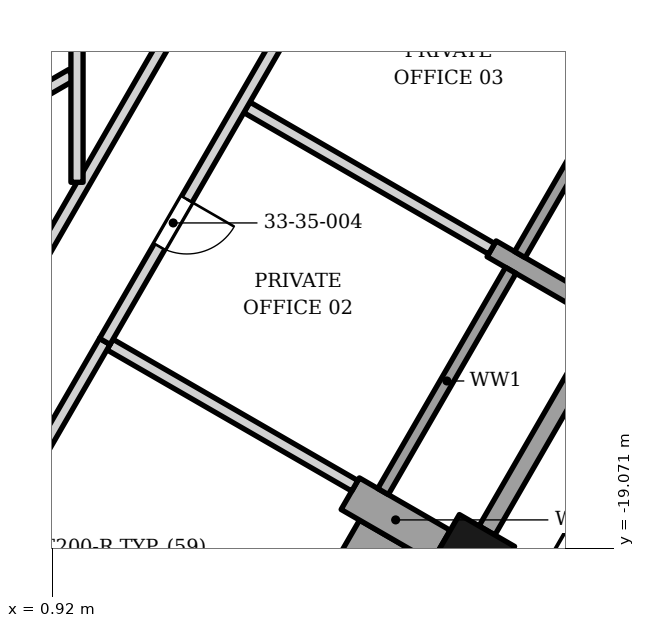
"""IFC4 building model, lengths in metres.
Left out: names, types, materials, properties, quantities, classifications, styles, units other than length and angle.
Written with IfcOpenShell. Run it as: python <this file> out.ifc"""

import sys

from ifc_helpers import new_model, si_unit, direction, frame, frame_2d, origin, origin_2d, place, context, subcontext, project, spatial, polyline, rectangle, outline, extrude, element, fill, save


model = new_model("IFC4")
c1 = context("Model", 3, precision=1e-05, world=origin(), true_north=direction((0.0, 1.0)))
c2 = subcontext(c1, "Body", "Model", "MODEL_VIEW")
j1 = project(units=[si_unit("LENGTHUNIT", "METRE"), si_unit("PLANEANGLEUNIT", "RADIAN")], contexts=[c1])
p1 = place(None, origin())
s1 = spatial("IfcSite", under=j1, at=p1, CompositionType="ELEMENT")
p2 = place(p1, origin())
s2 = spatial("IfcBuilding", under=s1, at=p2, CompositionType="ELEMENT")
p3 = place(p2, frame((0.0, 0.0, 144.6)))
s3 = spatial("IfcBuildingStorey", under=s2, at=p3, CompositionType="ELEMENT", Elevation=144.6)
p4 = place(p3, frame((7.846, -19.167, 0.0), z_axis=(0.0, 0.0, 1.0), x_axis=(0.499999984885, 0.866025412511, 0.0)))
e1 = element("IfcColumn", 1, at=p4, inside=s3, PredefinedType="COLUMN", context=c2, shape_type="SweptSolid", body=[
    extrude(rectangle(XDim=0.9, YDim=1.05, at=origin_2d()), origin(), (0.0, 0.0, 1.0), 3.9),
])
p5 = place(p3, frame((7.316, -19.034, 0.0), z_axis=(0.0, 0.0, 1.0), x_axis=(-0.866013532718, 0.500020560727, 0.0)))
e2 = element("IfcWall", 2, at=p5, inside=s3, PredefinedType="SOLIDWALL", context=c2, shape_type="SweptSolid", body=[
    extrude(rectangle(XDim=1.725, YDim=0.6, at=frame_2d((0.863, 0.0))), origin(), (0.0, 0.0, 1.0), 3.0),
])
p6 = place(p3, frame((9.641, -15.007, 0.0), z_axis=(0.0, 0.0, 1.0), x_axis=(-0.866013532718, 0.500020560727, 0.0)))
e3 = element("IfcWall", 3, at=p6, inside=s3, PredefinedType="SOLIDWALL", context=c2, shape_type="SweptSolid", body=[
    extrude(rectangle(XDim=1.725, YDim=0.3, at=frame_2d((0.863, 0.0))), origin(), (0.0, 0.0, 1.0), 3.0),
])
p7 = place(p3, frame((8.071, -18.777, 0.0), z_axis=(0.0, 0.0, 1.0), x_axis=(0.500012057535, 0.866018442252, 0.0)))
e4 = element("IfcWall", 4, at=p7, inside=s3, PredefinedType="SOLIDWALL", context=c2, shape_type="SweptSolid", body=[
    extrude(rectangle(XDim=3.6, YDim=0.3, at=frame_2d((1.8, 0.0))), origin(), (0.0, 0.0, 1.0), 3.0),
])
p8 = place(p3, frame((6.362, -18.137, 0.0), z_axis=(0.0, 0.0, 1.0), x_axis=(0.500002543286, 0.866023935413, 0.0)))
e5 = element("IfcWall", 5, at=p8, inside=s3, PredefinedType="ELEMENTEDWALL", context=c2, shape_type="SweptSolid", body=[
    extrude(rectangle(XDim=4.2, YDim=0.2, at=frame_2d((2.1, 0.0))), origin(), (0.0, 0.0, 1.0), 3.0),
])
p9 = place(p3, frame((8.612, -14.24, 0.0), z_axis=(0.0, 0.0, 1.0), x_axis=(0.500027713859, 0.866009402589, 0.0)))
e6 = element("IfcWall", 6, at=p9, inside=s3, PredefinedType="ELEMENTEDWALL", context=c2, shape_type="SweptSolid", body=[
    extrude(rectangle(XDim=4.2, YDim=0.2, at=frame_2d((2.1, 0.0))), origin(), (0.0, 0.0, 1.0), 2.95),
])
p10 = place(p3, origin())
e7 = element("IfcWall", 7, at=p10, inside=s3, PredefinedType="SOLIDWALL", context=c2, shape_type="SweptSolid", body=[
    extrude(outline(polyline([(8.075, -19.819), (5.975, -18.606), (5.15, -20.036), (7.25, -21.248), (8.075, -19.819)])), origin(), (0.0, 0.0, 1.0), 3.0),
])
p11 = place(p3, frame((1.869, -15.719, 0.0), z_axis=(0.0, 0.0, 1.0), x_axis=(0.866183837695, -0.499725483956, 0.0)))
e8 = element("IfcWall", 8, at=p11, inside=s3, PredefinedType="PARTITIONING", context=c2, shape_type="SweptSolid", body=[
    extrude(rectangle(XDim=4.649, YDim=0.2, at=frame_2d((2.325, 0.0))), origin(), (0.0, 0.0, 1.0), 3.052),
])
p12 = place(p3, frame((0.076, -18.624, 0.0), z_axis=(0.0, 0.0, 1.0), x_axis=(0.500452706258, 0.865763875892, 0.0)))
e9 = element("IfcWall", 9, at=p12, inside=s3, PredefinedType="PARTITIONING", context=c2, shape_type="SweptSolid", body=[
    extrude(rectangle(XDim=3.414, YDim=0.2, at=frame_2d((1.707, 0.0))), origin(), (0.0, 0.0, 1.0), 3.128),
])
p13 = place(p3, frame((0.076, -15.423, 0.0), z_axis=(0.0, 0.0, 1.0), x_axis=(0.499393409799, 0.866375335666, 0.0)))
e10 = element("IfcWall", 10, at=p13, inside=s3, PredefinedType="PARTITIONING", context=c2, shape_type="SweptSolid", body=[
    extrude(rectangle(XDim=11.306, YDim=0.2, at=frame_2d((5.653, 0.0))), origin(), (0.0, 0.0, 1.0), 2.884),
])
p14 = place(p13, frame((6.455, 0.0, 0.0)))
e11 = element("IfcOpeningElement", 11, at=p14, cuts=e10, PredefinedType="OPENING", context=c2, shape_type="SweptSolid", body=[
    extrude(rectangle(XDim=0.9, YDim=2.1, at=frame_2d((0.45, 1.05))), frame((0.0, 0.11, 0.0), z_axis=(0.0, -1.0, 0.0), x_axis=(1.0, 0.0, 0.0)), (0.0, 0.0, 1.0), 0.22),
])
p15 = place(p3, frame((4.121, -11.818, 0.0), z_axis=(0.0, 0.0, 1.0), x_axis=(0.865845361661, -0.500311712526, 0.0)))
e12 = element("IfcWall", 12, at=p15, inside=s3, PredefinedType="PARTITIONING", context=c2, shape_type="SweptSolid", body=[
    extrude(rectangle(XDim=4.65, YDim=0.2, at=frame_2d((2.325, 0.0))), origin(), (0.0, 0.0, 1.0), 2.884),
])
p16 = place(p3, frame((0.7, -11.596, 0.0), z_axis=(0.0, 0.0, 1.0), x_axis=(0.866015917575, 0.500016430238, 0.0)))
e13 = element("IfcWall", 13, at=p16, inside=s3, PredefinedType="PARTITIONING", context=c2, shape_type="SweptSolid", body=[
    extrude(rectangle(XDim=0.623, YDim=0.2, at=frame_2d((0.312, 0.0))), origin(), (0.0, 0.0, 1.0), 3.73),
])
p17 = place(p3, frame((1.328, -13.051, 0.0), z_axis=(0.0, 0.0, 1.0), x_axis=(0.0, 1.0, 0.0)))
e14 = element("IfcWall", 14, at=p17, inside=s3, PredefinedType="PARTITIONING", context=c2, shape_type="SweptSolid", body=[
    extrude(rectangle(XDim=7.42, YDim=0.2, at=frame_2d((3.71, 0.0))), origin(), (0.0, 0.0, 1.0), 2.95),
])
p18 = place(p3, frame((1.785, -15.668, 0.0), z_axis=(0.0, 0.0, 1.0), x_axis=(0.5000018851, 0.866024315419, 0.0)))
e15 = element("IfcWall", 15, at=p18, inside=s3, PredefinedType="PARTITIONING", context=c2, shape_type="SweptSolid", body=[
    extrude(rectangle(XDim=18.0, YDim=0.2, at=frame_2d((9.0, 0.0))), origin(), (0.0, 0.0, 1.0), 2.884),
])
p19 = place(p18, frame((1.8, 0.0, 0.0)))
e16 = element("IfcOpeningElement", 16, at=p19, cuts=e15, PredefinedType="OPENING", context=c2, shape_type="SweptSolid", body=[
    extrude(rectangle(XDim=0.9, YDim=2.1, at=frame_2d((0.45, 1.05))), frame((0.0, 0.11, 0.0), z_axis=(0.0, -1.0, 0.0), x_axis=(1.0, 0.0, 0.0)), (0.0, 0.0, 1.0), 0.22),
])
p20 = place(p18, frame((6.3, 0.0, 0.0)))
e17 = element("IfcOpeningElement", 17, at=p20, cuts=e15, PredefinedType="OPENING", context=c2, shape_type="SweptSolid", body=[
    extrude(rectangle(XDim=0.9, YDim=2.1, at=frame_2d((0.45, 1.05))), frame((0.0, 0.11, 0.0), z_axis=(0.0, -1.0, 0.0), x_axis=(1.0, 0.0, 0.0)), (0.0, 0.0, 1.0), 0.22),
])
p21 = place(p18, frame((13.0, 0.0, 0.0)))
e18 = element("IfcOpeningElement", 18, at=p21, cuts=e15, PredefinedType="OPENING", context=c2, shape_type="SweptSolid", body=[
    extrude(rectangle(XDim=1.0, YDim=2.1, at=frame_2d((0.5, 1.05))), frame((0.0, 0.11, 0.0), z_axis=(0.0, -1.0, 0.0), x_axis=(1.0, 0.0, 0.0)), (0.0, 0.0, 1.0), 0.22),
])
p22 = place(p19, origin())
e19 = element("IfcDoor", 19, at=p22, inside=s3, OperationType="SINGLE_SWING_RIGHT", PredefinedType="DOOR", context=c2, shape_type="SweptSolid", body=[
    extrude(rectangle(XDim=0.9, YDim=2.1, at=frame_2d((0.45, 1.05))), frame((0.0, 0.025, 0.0), z_axis=(0.0, -1.0, 0.0), x_axis=(1.0, 0.0, 0.0)), (0.0, 0.0, 1.0), 0.05),
])
fill(e16, e19)
save(model, sys.argv[1])
